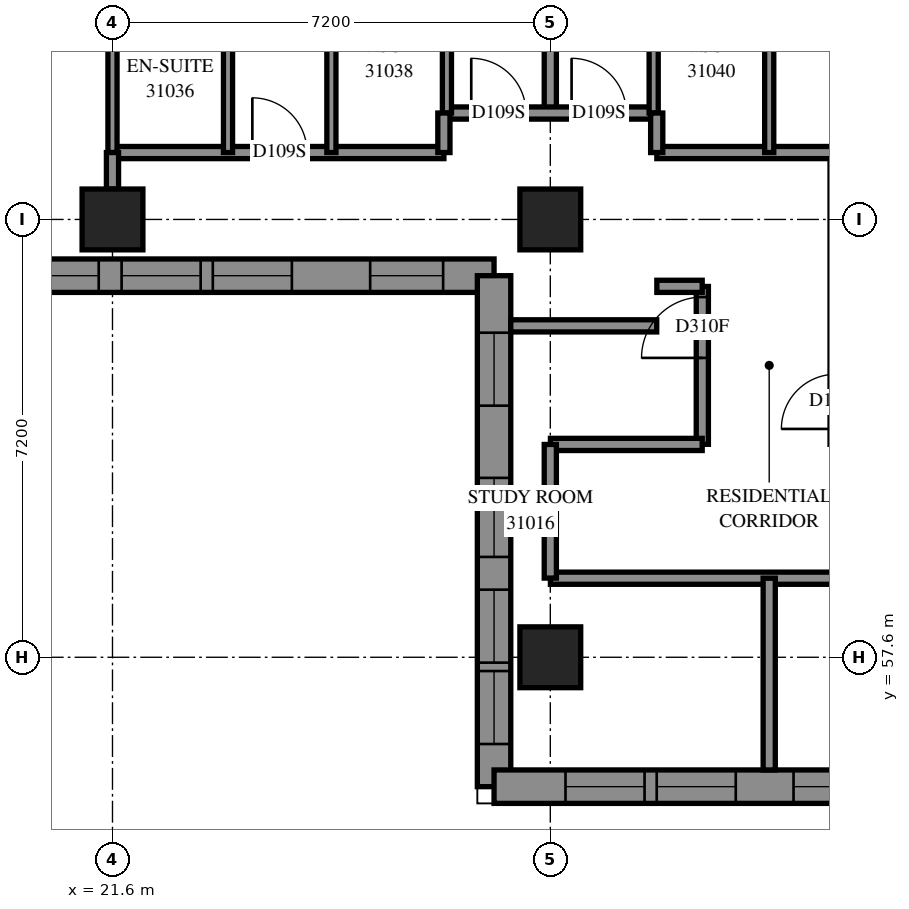
"""IFC4 building model, lengths in metres.
Left out: names, types, materials, properties, quantities, classifications, styles, units other than length and angle.
Written with IfcOpenShell. Run it as: python <this file> out.ifc"""

import sys

from ifc_helpers import new_model, si_unit, direction, frame, frame_2d, origin, origin_2d, place, context, subcontext, project, spatial, polyline, rectangle, outline, extrude, element, fill, save


model = new_model("IFC4")
c1 = context("Model", 3, precision=1e-05, world=origin(), true_north=direction((0.0, 1.0)))
c2 = subcontext(c1, "Body", "Model", "MODEL_VIEW")
j1 = project(units=[si_unit("LENGTHUNIT", "METRE"), si_unit("PLANEANGLEUNIT", "RADIAN")], contexts=[c1])
p1 = place(None, origin())
s1 = spatial("IfcSite", under=j1, at=p1, CompositionType="ELEMENT")
p2 = place(p1, origin())
s2 = spatial("IfcBuilding", under=s1, at=p2, CompositionType="ELEMENT")
p3 = place(p2, frame((0.0, 0.0, 115.2)))
s3 = spatial("IfcBuildingStorey", under=s2, at=p3, CompositionType="ELEMENT", Elevation=115.2)
for number, where, z_axis, x_axis in (
    (1, (21.6, 64.8, 0.0), (0.0, 0.0, 1.0), (1.0, 0.0, 0.0)),
    (2, (28.8, 57.6, 0.0), (0.0, 0.0, 1.0), (1.0, 0.0, 0.0)),
    (3, (28.8, 64.8, 0.0), (0.0, 0.0, 1.0), (1.0, 0.0, 0.0)),
):
    element("IfcColumn", number, at=place(p3, frame(where, z_axis=z_axis, x_axis=x_axis)), inside=s3, PredefinedType="COLUMN", context=c2, shape_type="SweptSolid", body=[
        extrude(rectangle(XDim=1.0, YDim=1.0, at=origin_2d()), origin(), (0.0, 0.0, 1.0), 3.1),
    ])
p4 = place(p3, frame((19.472, 63.875, 0.0), z_axis=(0.0, 0.0, 1.0), x_axis=(1.0, 0.0, 0.0)))
e4 = element("IfcWall", 4, at=p4, inside=s3, PredefinedType="SOLIDWALL", context=c2, shape_type="SweptSolid", body=[
    extrude(outline(polyline([(-0.275, -0.275), (8.128, -0.275), (8.678, 0.275), (0.275, 0.275), (-0.275, -0.275)])), origin(), (0.0, 0.0, 1.0), 3.1),
])
p5 = place(p4, frame((2.278, 0.0, 0.5)))
e5 = element("IfcOpeningElement", 5, at=p5, cuts=e4, PredefinedType="OPENING", context=c2, shape_type="SweptSolid", body=[
    extrude(rectangle(XDim=1.3, YDim=2.45, at=frame_2d((0.65, 1.225))), frame((0.0, 0.285, 0.0), z_axis=(0.0, -1.0, 0.0), x_axis=(1.0, 0.0, 0.0)), (0.0, 0.0, 1.0), 0.57),
])
p6 = place(p4, frame((3.778, 0.0, 0.5)))
e6 = element("IfcOpeningElement", 6, at=p6, cuts=e4, PredefinedType="OPENING", context=c2, shape_type="SweptSolid", body=[
    extrude(rectangle(XDim=1.3, YDim=2.45, at=frame_2d((0.65, 1.225))), frame((0.0, 0.285, 0.0), z_axis=(0.0, -1.0, 0.0), x_axis=(1.0, 0.0, 0.0)), (0.0, 0.0, 1.0), 0.57),
])
p7 = place(p4, frame((0.702, 0.0, 0.5)))
e7 = element("IfcOpeningElement", 7, at=p7, cuts=e4, PredefinedType="OPENING", context=c2, shape_type="SweptSolid", body=[
    extrude(rectangle(XDim=1.2, YDim=2.45, at=frame_2d((0.6, 1.225))), frame((0.0, 0.285, 0.0), z_axis=(0.0, -1.0, 0.0), x_axis=(1.0, 0.0, 0.0)), (0.0, 0.0, 1.0), 0.57),
])
p8 = place(p4, frame((6.365, 0.0, 0.5)))
e8 = element("IfcOpeningElement", 8, at=p8, cuts=e4, PredefinedType="OPENING", context=c2, shape_type="SweptSolid", body=[
    extrude(rectangle(XDim=1.2, YDim=2.45, at=frame_2d((0.6, 1.225))), frame((0.0, 0.285, 0.0), z_axis=(0.0, -1.0, 0.0), x_axis=(1.0, 0.0, 0.0)), (0.0, 0.0, 1.0), 0.57),
])
p9 = place(p3, frame((27.875, 63.875, 0.0), z_axis=(0.0, 0.0, 1.0), x_axis=(0.0, -1.0, 0.0)))
e9 = element("IfcWall", 9, at=p9, inside=s3, PredefinedType="SOLIDWALL", context=c2, shape_type="SweptSolid", body=[
    extrude(outline(polyline([(0.275, -0.275), (8.678, -0.275), (8.128, 0.275), (-0.275, 0.275), (0.275, -0.275)])), origin(), (0.0, 0.0, 1.0), 3.1),
])
p10 = place(p9, frame((3.325, 0.0, 0.5)))
e10 = element("IfcOpeningElement", 10, at=p10, cuts=e9, PredefinedType="OPENING", context=c2, shape_type="SweptSolid", body=[
    extrude(rectangle(XDim=1.3, YDim=2.45, at=frame_2d((0.65, 1.225))), frame((0.0, 0.285, 0.0), z_axis=(0.0, -1.0, 0.0), x_axis=(1.0, 0.0, 0.0)), (0.0, 0.0, 1.0), 0.57),
])
p11 = place(p9, frame((0.938, 0.0, 0.5)))
e11 = element("IfcOpeningElement", 11, at=p11, cuts=e9, PredefinedType="OPENING", context=c2, shape_type="SweptSolid", body=[
    extrude(rectangle(XDim=1.2, YDim=2.45, at=frame_2d((0.6, 1.225))), frame((0.0, 0.285, 0.0), z_axis=(0.0, -1.0, 0.0), x_axis=(1.0, 0.0, 0.0)), (0.0, 0.0, 1.0), 0.57),
])
p12 = place(p9, frame((6.502, 0.0, 0.5)))
e12 = element("IfcOpeningElement", 12, at=p12, cuts=e9, PredefinedType="OPENING", context=c2, shape_type="SweptSolid", body=[
    extrude(rectangle(XDim=1.2, YDim=2.45, at=frame_2d((0.6, 1.225))), frame((0.0, 0.285, 0.0), z_axis=(0.0, -1.0, 0.0), x_axis=(1.0, 0.0, 0.0)), (0.0, 0.0, 1.0), 0.57),
])
p13 = place(p9, frame((5.163, 0.0, 0.5)))
e13 = element("IfcOpeningElement", 13, at=p13, cuts=e9, PredefinedType="OPENING", context=c2, shape_type="SweptSolid", body=[
    extrude(rectangle(XDim=1.2, YDim=2.45, at=frame_2d((0.6, 1.225))), frame((0.0, 0.285, 0.0), z_axis=(0.0, -1.0, 0.0), x_axis=(1.0, 0.0, 0.0)), (0.0, 0.0, 1.0), 0.57),
])
p14 = place(p3, frame((27.875, 55.472, 0.0), z_axis=(0.0, 0.0, 1.0), x_axis=(1.0, 0.0, 0.0)))
e14 = element("IfcWall", 14, at=p14, inside=s3, PredefinedType="SOLIDWALL", context=c2, shape_type="SweptSolid", body=[
    extrude(outline(polyline([(-0.275, -0.275), (14.125, -0.275), (14.675, 0.275), (0.275, 0.275), (-0.275, -0.275)])), origin(), (0.0, 0.0, 1.0), 3.1),
])
p15 = place(p14, frame((1.175, 0.0, 0.5)))
e15 = element("IfcOpeningElement", 15, at=p15, cuts=e14, PredefinedType="OPENING", context=c2, shape_type="SweptSolid", body=[
    extrude(rectangle(XDim=1.3, YDim=2.45, at=frame_2d((0.65, 1.225))), frame((0.0, 0.285, 0.0), z_axis=(0.0, -1.0, 0.0), x_axis=(1.0, 0.0, 0.0)), (0.0, 0.0, 1.0), 0.57),
])
p16 = place(p14, frame((2.675, 0.0, 0.5)))
e16 = element("IfcOpeningElement", 16, at=p16, cuts=e14, PredefinedType="OPENING", context=c2, shape_type="SweptSolid", body=[
    extrude(rectangle(XDim=1.3, YDim=2.45, at=frame_2d((0.65, 1.225))), frame((0.0, 0.285, 0.0), z_axis=(0.0, -1.0, 0.0), x_axis=(1.0, 0.0, 0.0)), (0.0, 0.0, 1.0), 0.57),
])
p17 = place(p14, frame((4.925, 0.0, 0.5)))
e17 = element("IfcOpeningElement", 17, at=p17, cuts=e14, PredefinedType="OPENING", context=c2, shape_type="SweptSolid", body=[
    extrude(rectangle(XDim=1.3, YDim=2.45, at=frame_2d((0.65, 1.225))), frame((0.0, 0.285, 0.0), z_axis=(0.0, -1.0, 0.0), x_axis=(1.0, 0.0, 0.0)), (0.0, 0.0, 1.0), 0.57),
])
p18 = place(p14, frame((6.425, 0.0, 0.5)))
e18 = element("IfcOpeningElement", 18, at=p18, cuts=e14, PredefinedType="OPENING", context=c2, shape_type="SweptSolid", body=[
    extrude(rectangle(XDim=1.3, YDim=2.45, at=frame_2d((0.65, 1.225))), frame((0.0, 0.285, 0.0), z_axis=(0.0, -1.0, 0.0), x_axis=(1.0, 0.0, 0.0)), (0.0, 0.0, 1.0), 0.57),
])
p19 = place(p14, frame((8.275, 0.0, 0.5)))
e19 = element("IfcOpeningElement", 19, at=p19, cuts=e14, PredefinedType="OPENING", context=c2, shape_type="SweptSolid", body=[
    extrude(rectangle(XDim=1.3, YDim=2.45, at=frame_2d((0.65, 1.225))), frame((0.0, 0.285, 0.0), z_axis=(0.0, -1.0, 0.0), x_axis=(1.0, 0.0, 0.0)), (0.0, 0.0, 1.0), 0.57),
])
p20 = place(p14, frame((9.775, 0.0, 0.5)))
e20 = element("IfcOpeningElement", 20, at=p20, cuts=e14, PredefinedType="OPENING", context=c2, shape_type="SweptSolid", body=[
    extrude(rectangle(XDim=1.3, YDim=2.45, at=frame_2d((0.65, 1.225))), frame((0.0, 0.285, 0.0), z_axis=(0.0, -1.0, 0.0), x_axis=(1.0, 0.0, 0.0)), (0.0, 0.0, 1.0), 0.57),
])
p21 = place(p14, frame((12.363, 0.0, 0.5)))
e21 = element("IfcOpeningElement", 21, at=p21, cuts=e14, PredefinedType="OPENING", context=c2, shape_type="SweptSolid", body=[
    extrude(rectangle(XDim=1.2, YDim=2.45, at=frame_2d((0.6, 1.225))), frame((0.0, 0.285, 0.0), z_axis=(0.0, -1.0, 0.0), x_axis=(1.0, 0.0, 0.0)), (0.0, 0.0, 1.0), 0.57),
])
p22 = place(p3, frame((28.802, 58.9, 0.0), z_axis=(0.0, 0.0, 1.0), x_axis=(1.0, 0.0, 0.0)))
e22 = element("IfcWall", 22, at=p22, inside=s3, PredefinedType="PARTITIONING", context=c2, shape_type="SweptSolid", body=[
    extrude(rectangle(XDim=24.098, YDim=0.2, at=frame_2d((12.049, 0.0))), origin(), (0.0, 0.0, 1.0), 3.1),
])
p23 = place(p22, frame((11.323, 0.0, 0.0)))
e23 = element("IfcOpeningElement", 23, at=p23, cuts=e22, PredefinedType="OPENING", context=c2, shape_type="SweptSolid", body=[
    extrude(rectangle(XDim=1.0, YDim=2.1, at=frame_2d((0.5, 1.05))), frame((0.0, 0.11, 0.0), z_axis=(0.0, -1.0, 0.0), x_axis=(1.0, 0.0, 0.0)), (0.0, 0.0, 1.0), 0.22),
])
p24 = place(p22, frame((14.908, 0.0, 0.0)))
e24 = element("IfcOpeningElement", 24, at=p24, cuts=e22, PredefinedType="OPENING", context=c2, shape_type="SweptSolid", body=[
    extrude(rectangle(XDim=0.9, YDim=2.1, at=frame_2d((0.45, 1.05))), frame((0.0, 0.11, 0.0), z_axis=(0.0, -1.0, 0.0), x_axis=(1.0, 0.0, 0.0)), (0.0, 0.0, 1.0), 0.22),
])
p25 = place(p22, frame((18.523, 0.0, 0.0)))
e25 = element("IfcOpeningElement", 25, at=p25, cuts=e22, PredefinedType="OPENING", context=c2, shape_type="SweptSolid", body=[
    extrude(rectangle(XDim=1.0, YDim=2.1, at=frame_2d((0.5, 1.05))), frame((0.0, 0.11, 0.0), z_axis=(0.0, -1.0, 0.0), x_axis=(1.0, 0.0, 0.0)), (0.0, 0.0, 1.0), 0.22),
])
p26 = place(p22, frame((22.845, 0.0, 0.0)))
e26 = element("IfcOpeningElement", 26, at=p26, cuts=e22, PredefinedType="OPENING", context=c2, shape_type="SweptSolid", body=[
    extrude(rectangle(XDim=1.0, YDim=2.1, at=frame_2d((0.5, 1.05))), frame((0.0, 0.11, 0.0), z_axis=(0.0, -1.0, 0.0), x_axis=(1.0, 0.0, 0.0)), (0.0, 0.0, 1.0), 0.22),
])
p27 = place(p3, frame((21.6, 65.9, 0.0), z_axis=(0.0, 0.0, 1.0), x_axis=(1.0, 0.0, 0.0)))
e27 = element("IfcWall", 27, at=p27, inside=s3, PredefinedType="PARTITIONING", context=c2, shape_type="SweptSolid", body=[
    extrude(rectangle(XDim=5.45, YDim=0.2, at=frame_2d((2.725, 0.0))), origin(), (0.0, 0.0, 1.0), 3.1),
])
p28 = place(p27, frame((2.3, 0.0, 0.0)))
e28 = element("IfcOpeningElement", 28, at=p28, cuts=e27, PredefinedType="OPENING", context=c2, shape_type="SweptSolid", body=[
    extrude(rectangle(XDim=0.9, YDim=2.1, at=frame_2d((0.45, 1.05))), frame((0.0, 0.11, 0.0), z_axis=(0.0, -1.0, 0.0), x_axis=(1.0, 0.0, 0.0)), (0.0, 0.0, 1.0), 0.22),
])
p29 = place(p3, frame((28.8, 66.55, 0.0), z_axis=(0.0, 0.0, 1.0), x_axis=(0.0, 1.0, 0.0)))
e29 = element("IfcWall", 29, at=p29, inside=s3, PredefinedType="PARTITIONING", context=c2, shape_type="SweptSolid", body=[
    extrude(rectangle(XDim=4.95, YDim=0.2, at=frame_2d((2.475, 0.0))), origin(), (0.0, 0.0, 1.0), 3.1),
])
p30 = place(p3, frame((27.1, 66.55, 0.0), z_axis=(0.0, 0.0, 1.0), x_axis=(1.0, 0.0, 0.0)))
e30 = element("IfcWall", 30, at=p30, inside=s3, PredefinedType="PARTITIONING", context=c2, shape_type="SweptSolid", body=[
    extrude(rectangle(XDim=3.4, YDim=0.2, at=frame_2d((1.7, 0.0))), origin(), (0.0, 0.0, 1.0), 3.1),
])
p31 = place(p30, frame((0.4, 0.0, 0.0)))
e31 = element("IfcOpeningElement", 31, at=p31, cuts=e30, PredefinedType="OPENING", context=c2, shape_type="SweptSolid", body=[
    extrude(rectangle(XDim=0.9, YDim=2.1, at=frame_2d((0.45, 1.05))), frame((0.0, 0.11, 0.0), z_axis=(0.0, -1.0, 0.0), x_axis=(1.0, 0.0, 0.0)), (0.0, 0.0, 1.0), 0.22),
])
p32 = place(p30, frame((2.05, 0.0, 0.0)))
e32 = element("IfcOpeningElement", 32, at=p32, cuts=e30, PredefinedType="OPENING", context=c2, shape_type="SweptSolid", body=[
    extrude(rectangle(XDim=0.9, YDim=2.1, at=frame_2d((0.45, 1.05))), frame((0.0, 0.11, 0.0), z_axis=(0.0, -1.0, 0.0), x_axis=(1.0, 0.0, 0.0)), (0.0, 0.0, 1.0), 0.22),
])
p33 = place(p3, frame((32.4, 55.747, 0.0), z_axis=(0.0, 0.0, 1.0), x_axis=(0.0, 1.0, 0.0)))
e33 = element("IfcWall", 33, at=p33, inside=s3, PredefinedType="PARTITIONING", context=c2, shape_type="SweptSolid", body=[
    extrude(rectangle(XDim=3.153, YDim=0.2, at=frame_2d((1.577, 0.0))), origin(), (0.0, 0.0, 1.0), 3.1),
])
p34 = place(p3, frame((30.552, 65.9, 0.0), z_axis=(0.0, 0.0, 1.0), x_axis=(1.0, 0.0, 0.0)))
e34 = element("IfcWall", 34, at=p34, inside=s3, PredefinedType="PARTITIONING", context=c2, shape_type="SweptSolid", body=[
    extrude(rectangle(XDim=2.948, YDim=0.2, at=frame_2d((1.474, 0.0))), origin(), (0.0, 0.0, 1.0), 3.1),
])
p35 = place(p3, frame((31.3, 61.102, 0.0), z_axis=(0.0, 0.0, 1.0), x_axis=(0.0, 1.0, 0.0)))
e35 = element("IfcWall", 35, at=p35, inside=s3, PredefinedType="PARTITIONING", context=c2, shape_type="SweptSolid", body=[
    extrude(rectangle(XDim=2.596, YDim=0.2, at=frame_2d((1.298, 0.0))), origin(), (0.0, 0.0, 1.0), 3.1),
])
p36 = place(p35, frame((1.421, 0.0, 0.0)))
e36 = element("IfcOpeningElement", 36, at=p36, cuts=e35, PredefinedType="OPENING", context=c2, shape_type="SweptSolid", body=[
    extrude(rectangle(XDim=1.0, YDim=2.1, at=frame_2d((0.5, 1.05))), frame((0.0, 0.11, 0.0), z_axis=(0.0, -1.0, 0.0), x_axis=(1.0, 0.0, 0.0)), (0.0, 0.0, 1.0), 0.22),
])
p37 = place(p3, frame((28.802, 61.1, 0.0), z_axis=(0.0, 0.0, 1.0), x_axis=(1.0, 0.0, 0.0)))
e37 = element("IfcWall", 37, at=p37, inside=s3, PredefinedType="PARTITIONING", context=c2, shape_type="SweptSolid", body=[
    extrude(rectangle(XDim=2.496, YDim=0.2, at=frame_2d((1.248, 0.0))), origin(), (0.0, 0.0, 1.0), 3.1),
])
p38 = place(p3, frame((21.6, 65.9, 0.0), z_axis=(0.0, 0.0, 1.0), x_axis=(0.0, 1.0, 0.0)))
e38 = element("IfcWall", 38, at=p38, inside=s3, PredefinedType="PARTITIONING", context=c2, shape_type="SweptSolid", body=[
    extrude(rectangle(XDim=2.4, YDim=0.15, at=frame_2d((1.2, 0.0))), origin(), (0.0, 0.0, 1.0), 2.6),
])
for number, where, z_axis, x_axis in (
    (39, (23.5, 65.9, 0.0), (0.0, 0.0, 1.0), (0.0, 1.0, 0.0)),
    (40, (25.2, 65.9, 0.0), (0.0, 0.0, 1.0), (0.0, 1.0, 0.0)),
    (41, (32.4, 65.9, 0.0), (0.0, 0.0, 1.0), (0.0, 1.0, 0.0)),
):
    element("IfcWall", number, at=place(p3, frame(where, z_axis=z_axis, x_axis=x_axis)), inside=s3, PredefinedType="PARTITIONING", context=c2, shape_type="SweptSolid", body=[
        extrude(rectangle(XDim=2.4, YDim=0.15, at=frame_2d((1.2, 0.0))), origin(), (0.0, 0.0, 1.0), 3.1),
    ])
p39 = place(p3, frame((28.15, 63.05, 0.0), z_axis=(0.0, 0.0, 1.0), x_axis=(1.0, 0.0, 0.0)))
e42 = element("IfcWall", 42, at=p39, inside=s3, PredefinedType="PARTITIONING", context=c2, shape_type="SweptSolid", body=[
    extrude(rectangle(XDim=2.4, YDim=0.2, at=frame_2d((1.2, 0.0))), origin(), (0.0, 0.0, 1.0), 3.1),
])
p40 = place(p3, frame((28.8, 58.902, 0.0), z_axis=(0.0, 0.0, 1.0), x_axis=(0.0, 1.0, 0.0)))
e43 = element("IfcWall", 43, at=p40, inside=s3, PredefinedType="PARTITIONING", context=c2, shape_type="SweptSolid", body=[
    extrude(rectangle(XDim=2.198, YDim=0.2, at=frame_2d((1.099, 0.0))), origin(), (0.0, 0.0, 1.0), 2.6),
])
for number, where, z_axis, x_axis in (
    (44, (27.1, 66.55, 0.0), (0.0, 0.0, 1.0), (0.0, 1.0, 0.0)),
    (45, (30.5, 66.55, 0.0), (0.0, 0.0, 1.0), (0.0, 1.0, 0.0)),
):
    element("IfcWall", number, at=place(p3, frame(where, z_axis=z_axis, x_axis=x_axis)), inside=s3, PredefinedType="PARTITIONING", context=c2, shape_type="SweptSolid", body=[
        extrude(rectangle(XDim=1.75, YDim=0.15, at=frame_2d((0.875, 0.0))), origin(), (0.0, 0.0, 1.0), 3.1),
    ])
p41 = place(p3, frame((30.552, 63.7, 0.0), z_axis=(0.0, 0.0, 1.0), x_axis=(1.0, 0.0, 0.0)))
e46 = element("IfcWall", 46, at=p41, inside=s3, PredefinedType="PARTITIONING", context=c2, shape_type="SweptSolid", body=[
    extrude(rectangle(XDim=0.746, YDim=0.2, at=frame_2d((0.373, 0.0))), origin(), (0.0, 0.0, 1.0), 3.1),
])
for number, where, z_axis, x_axis in (
    (47, (27.05, 65.9, 0.0), (0.0, 0.0, 1.0), (0.0, 1.0, 0.0)),
    (48, (30.55, 65.9, 0.0), (0.0, 0.0, 1.0), (0.0, 1.0, 0.0)),
):
    element("IfcWall", number, at=place(p3, frame(where, z_axis=z_axis, x_axis=x_axis)), inside=s3, PredefinedType="PARTITIONING", context=c2, shape_type="SweptSolid", body=[
        extrude(rectangle(XDim=0.65, YDim=0.2, at=frame_2d((0.325, 0.0))), origin(), (0.0, 0.0, 1.0), 3.1),
    ])
p42 = place(p3, frame((21.6, 65.3, 0.0), z_axis=(0.0, 0.0, 1.0), x_axis=(0.0, 1.0, 0.0)))
e49 = element("IfcWall", 49, at=p42, inside=s3, PredefinedType="PARTITIONING", context=c2, shape_type="SweptSolid", body=[
    extrude(rectangle(XDim=0.6, YDim=0.2, at=frame_2d((0.3, 0.0))), origin(), (0.0, 0.0, 1.0), 2.6),
])
p43 = place(p5, origin())
e50 = element("IfcWindow", 50, at=p43, inside=s3, PartitioningType="SINGLE_PANEL", PredefinedType="WINDOW", context=c2, shape_type="SweptSolid", body=[
    extrude(rectangle(XDim=1.3, YDim=2.45, at=frame_2d((0.65, 1.225))), frame((0.0, 0.155, 0.0), z_axis=(0.0, -1.0, 0.0), x_axis=(1.0, 0.0, 0.0)), (0.0, 0.0, 1.0), 0.06),
])
fill(e5, e50)
p44 = place(p6, origin())
e51 = element("IfcWindow", 51, at=p44, inside=s3, PartitioningType="SINGLE_PANEL", PredefinedType="WINDOW", context=c2, shape_type="SweptSolid", body=[
    extrude(rectangle(XDim=1.3, YDim=2.45, at=frame_2d((0.65, 1.225))), frame((0.0, 0.155, 0.0), z_axis=(0.0, -1.0, 0.0), x_axis=(1.0, 0.0, 0.0)), (0.0, 0.0, 1.0), 0.06),
])
fill(e6, e51)
p45 = place(p7, origin())
e52 = element("IfcWindow", 52, at=p45, inside=s3, PartitioningType="SINGLE_PANEL", PredefinedType="WINDOW", context=c2, shape_type="SweptSolid", body=[
    extrude(rectangle(XDim=1.2, YDim=2.45, at=frame_2d((0.6, 1.225))), frame((0.0, 0.155, 0.0), z_axis=(0.0, -1.0, 0.0), x_axis=(1.0, 0.0, 0.0)), (0.0, 0.0, 1.0), 0.06),
])
fill(e7, e52)
p46 = place(p8, origin())
e53 = element("IfcWindow", 53, at=p46, inside=s3, PartitioningType="SINGLE_PANEL", PredefinedType="WINDOW", context=c2, shape_type="SweptSolid", body=[
    extrude(rectangle(XDim=1.2, YDim=2.45, at=frame_2d((0.6, 1.225))), frame((0.0, 0.155, 0.0), z_axis=(0.0, -1.0, 0.0), x_axis=(1.0, 0.0, 0.0)), (0.0, 0.0, 1.0), 0.06),
])
fill(e8, e53)
p47 = place(p10, origin())
e54 = element("IfcWindow", 54, at=p47, inside=s3, PartitioningType="SINGLE_PANEL", PredefinedType="WINDOW", context=c2, shape_type="SweptSolid", body=[
    extrude(rectangle(XDim=1.3, YDim=2.45, at=frame_2d((0.65, 1.225))), frame((0.0, 0.155, 0.0), z_axis=(0.0, -1.0, 0.0), x_axis=(1.0, 0.0, 0.0)), (0.0, 0.0, 1.0), 0.06),
])
fill(e10, e54)
p48 = place(p11, origin())
e55 = element("IfcWindow", 55, at=p48, inside=s3, PartitioningType="SINGLE_PANEL", PredefinedType="WINDOW", context=c2, shape_type="SweptSolid", body=[
    extrude(rectangle(XDim=1.2, YDim=2.45, at=frame_2d((0.6, 1.225))), frame((0.0, 0.155, 0.0), z_axis=(0.0, -1.0, 0.0), x_axis=(1.0, 0.0, 0.0)), (0.0, 0.0, 1.0), 0.06),
])
fill(e11, e55)
p49 = place(p12, origin())
e56 = element("IfcWindow", 56, at=p49, inside=s3, PartitioningType="SINGLE_PANEL", PredefinedType="WINDOW", context=c2, shape_type="SweptSolid", body=[
    extrude(rectangle(XDim=1.2, YDim=2.45, at=frame_2d((0.6, 1.225))), frame((0.0, 0.155, 0.0), z_axis=(0.0, -1.0, 0.0), x_axis=(1.0, 0.0, 0.0)), (0.0, 0.0, 1.0), 0.06),
])
fill(e12, e56)
p50 = place(p15, origin())
e57 = element("IfcWindow", 57, at=p50, inside=s3, PartitioningType="SINGLE_PANEL", PredefinedType="WINDOW", context=c2, shape_type="SweptSolid", body=[
    extrude(rectangle(XDim=1.3, YDim=2.45, at=frame_2d((0.65, 1.225))), frame((0.0, 0.155, 0.0), z_axis=(0.0, -1.0, 0.0), x_axis=(1.0, 0.0, 0.0)), (0.0, 0.0, 1.0), 0.06),
])
fill(e15, e57)
p51 = place(p16, origin())
e58 = element("IfcWindow", 58, at=p51, inside=s3, PartitioningType="SINGLE_PANEL", PredefinedType="WINDOW", context=c2, shape_type="SweptSolid", body=[
    extrude(rectangle(XDim=1.3, YDim=2.45, at=frame_2d((0.65, 1.225))), frame((0.0, 0.155, 0.0), z_axis=(0.0, -1.0, 0.0), x_axis=(1.0, 0.0, 0.0)), (0.0, 0.0, 1.0), 0.06),
])
fill(e16, e58)
p52 = place(p17, origin())
e59 = element("IfcWindow", 59, at=p52, inside=s3, PartitioningType="SINGLE_PANEL", PredefinedType="WINDOW", context=c2, shape_type="SweptSolid", body=[
    extrude(rectangle(XDim=1.3, YDim=2.45, at=frame_2d((0.65, 1.225))), frame((0.0, 0.155, 0.0), z_axis=(0.0, -1.0, 0.0), x_axis=(1.0, 0.0, 0.0)), (0.0, 0.0, 1.0), 0.06),
])
fill(e17, e59)
p53 = place(p36, origin())
e60 = element("IfcDoor", 60, at=p53, inside=s3, OperationType="SINGLE_SWING_LEFT", PredefinedType="DOOR", context=c2, shape_type="SweptSolid", body=[
    extrude(rectangle(XDim=1.0, YDim=2.1, at=frame_2d((0.5, 1.05))), frame((0.0, 0.025, 0.0), z_axis=(0.0, -1.0, 0.0), x_axis=(1.0, 0.0, 0.0)), (0.0, 0.0, 1.0), 0.05),
])
fill(e36, e60)
p54 = place(p28, origin())
e61 = element("IfcDoor", 61, at=p54, inside=s3, OperationType="SINGLE_SWING_RIGHT", PredefinedType="DOOR", context=c2, shape_type="SweptSolid", body=[
    extrude(rectangle(XDim=0.9, YDim=2.1, at=frame_2d((0.45, 1.05))), frame((0.0, 0.025, 0.0), z_axis=(0.0, -1.0, 0.0), x_axis=(1.0, 0.0, 0.0)), (0.0, 0.0, 1.0), 0.05),
])
fill(e28, e61)
p55 = place(p31, origin())
e62 = element("IfcDoor", 62, at=p55, inside=s3, OperationType="SINGLE_SWING_LEFT", PredefinedType="DOOR", context=c2, shape_type="SweptSolid", body=[
    extrude(rectangle(XDim=0.9, YDim=2.1, at=frame_2d((0.45, 1.05))), frame((0.0, 0.025, 0.0), z_axis=(0.0, -1.0, 0.0), x_axis=(1.0, 0.0, 0.0)), (0.0, 0.0, 1.0), 0.05),
])
fill(e31, e62)
p56 = place(p32, origin())
e63 = element("IfcDoor", 63, at=p56, inside=s3, OperationType="SINGLE_SWING_RIGHT", PredefinedType="DOOR", context=c2, shape_type="SweptSolid", body=[
    extrude(rectangle(XDim=0.9, YDim=2.1, at=frame_2d((0.45, 1.05))), frame((0.0, 0.025, 0.0), z_axis=(0.0, -1.0, 0.0), x_axis=(1.0, 0.0, 0.0)), (0.0, 0.0, 1.0), 0.05),
])
fill(e32, e63)
p57 = place(p13, origin())
e64 = element("IfcWindow", 64, at=p57, inside=s3, PartitioningType="SINGLE_PANEL", PredefinedType="WINDOW", context=c2, shape_type="SweptSolid", body=[
    extrude(rectangle(XDim=1.2, YDim=2.45, at=frame_2d((0.6, 1.225))), frame((0.0, 0.155, 0.0), z_axis=(0.0, -1.0, 0.0), x_axis=(1.0, 0.0, 0.0)), (0.0, 0.0, 1.0), 0.06),
])
fill(e13, e64)
save(model, sys.argv[1])
